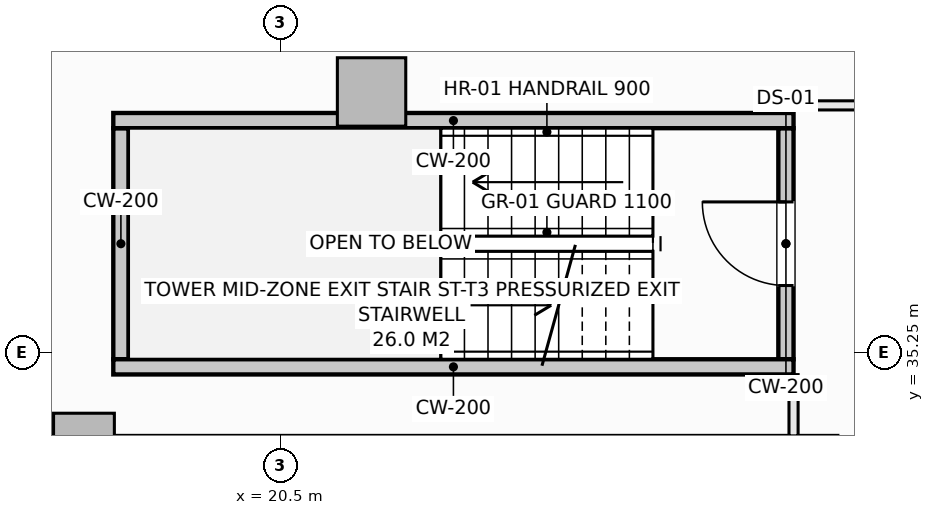
"""IFC4 building model, lengths in metres.
Left out: names, types, materials, properties, quantities, classifications, styles, units other than length and angle.
Written with IfcOpenShell. Run it as: python <this file> out.ifc"""

import sys

from ifc_helpers import new_model, si_unit, direction, frame, frame_2d, origin, origin_2d, place, context, subcontext, project, spatial, rectangle, extrude, element, fill, save


model = new_model("IFC4")
c1 = context("Model", 3, precision=1e-05, world=origin(), true_north=direction((0.0, 1.0)))
c2 = subcontext(c1, "Body", "Model", "MODEL_VIEW")
j1 = project(units=[si_unit("LENGTHUNIT", "METRE"), si_unit("PLANEANGLEUNIT", "RADIAN")], contexts=[c1])
p1 = place(None, origin())
s1 = spatial("IfcSite", under=j1, at=p1, CompositionType="ELEMENT")
p2 = place(p1, origin())
s2 = spatial("IfcBuilding", under=s1, at=p2, CompositionType="ELEMENT")
p3 = place(p2, frame((0.0, 0.0, 135.9)))
s3 = spatial("IfcBuildingStorey", under=s2, at=p3, CompositionType="ELEMENT", Elevation=135.9)
p4 = place(p3, frame((21.698, 38.677, -0.27), z_axis=(0.0, 0.0, 1.0), x_axis=(1.0, 0.0, 0.0)))
e1 = element("IfcColumn", 1, at=p4, inside=s3, PredefinedType="COLUMN", context=c2, shape_type="SweptSolid", body=[
    extrude(rectangle(XDim=0.9, YDim=0.9, at=origin_2d()), origin(), (0.0, 0.0, 1.0), 3.4),
])
p5 = place(p3, frame((17.914, 34.05, -0.27), z_axis=(0.0, 0.0, 1.0), x_axis=(1.0, 0.0, 0.0)))
e2 = element("IfcColumn", 2, at=p5, inside=s3, PredefinedType="PILASTER", context=c2, shape_type="SweptSolid", body=[
    extrude(rectangle(XDim=0.8, YDim=0.8, at=origin_2d()), origin(), (0.0, 0.0, 1.0), 3.4),
])
p6 = place(p3, frame((14.481, 39.223, 0.0), z_axis=(0.0, 0.0, 1.0), x_axis=(0.616435134162, 0.787405693001, 0.0)))
e3 = element("IfcWall", 3, at=p6, inside=s3, PredefinedType="SOLIDWALL", context=c2, shape_type="SweptSolid", body=[
    extrude(rectangle(XDim=5.759, YDim=0.3, at=frame_2d((2.879, 0.0))), origin(), (0.0, 0.0, 1.0), 2.653),
])
p7 = place(p6, frame((1.92, 0.0, 0.74)))
e4 = element("IfcOpeningElement", 4, at=p7, cuts=e3, PredefinedType="OPENING", context=c2, shape_type="SweptSolid", body=[
    extrude(rectangle(XDim=2.1, YDim=1.7, at=frame_2d((1.05, 0.85))), frame((0.0, 0.16, 0.0), z_axis=(0.0, -1.0, 0.0), x_axis=(1.0, 0.0, 0.0)), (0.0, 0.0, 1.0), 0.32),
])
p8 = place(p3, frame((27.15, 35.16, -0.27), z_axis=(0.0, 0.0, 1.0), x_axis=(0.0, 1.0, 0.0)))
e5 = element("IfcWall", 5, at=p8, inside=s3, PredefinedType="SHEAR", context=c2, shape_type="SweptSolid", body=[
    extrude(rectangle(XDim=3.04, YDim=0.2, at=frame_2d((1.52, 0.0))), origin(), (0.0, 0.0, 1.0), 3.4),
])
p9 = place(p8, frame((0.97, 0.0, 0.27)))
e6 = element("IfcOpeningElement", 6, at=p9, cuts=e5, PredefinedType="OPENING", context=c2, shape_type="SweptSolid", body=[
    extrude(rectangle(XDim=1.1, YDim=2.15, at=frame_2d((0.55, 1.075))), frame((0.0, 0.11, 0.0), z_axis=(0.0, -1.0, 0.0), x_axis=(1.0, 0.0, 0.0)), (0.0, 0.0, 1.0), 0.22),
])
p10 = place(p3, frame((18.4, 35.16, -0.27), z_axis=(0.0, 0.0, 1.0), x_axis=(0.0, 1.0, 0.0)))
e7 = element("IfcWall", 7, at=p10, inside=s3, PredefinedType="SHEAR", context=c2, shape_type="SweptSolid", body=[
    extrude(rectangle(XDim=3.04, YDim=0.2, at=frame_2d((1.52, 0.0))), origin(), (0.0, 0.0, 1.0), 3.4),
])
for number, where, z_axis, x_axis in (
    (8, (18.3, 38.3, -0.27), (0.0, 0.0, 1.0), (1.0, 0.0, 0.0)),
    (9, (18.3, 35.06, -0.27), (0.0, 0.0, 1.0), (1.0, 0.0, 0.0)),
):
    element("IfcWall", number, at=place(p3, frame(where, z_axis=z_axis, x_axis=x_axis)), inside=s3, PredefinedType="SHEAR", context=c2, shape_type="SweptSolid", body=[
        extrude(rectangle(XDim=8.95, YDim=0.2, at=frame_2d((4.475, 0.0))), origin(), (0.0, 0.0, 1.0), 3.4),
    ])
p11 = place(p3, frame((27.25, 34.152, 0.0), z_axis=(0.0, 0.0, 1.0), x_axis=(0.0, 1.0, 0.0)))
e10 = element("IfcWall", 10, at=p11, inside=s3, PredefinedType="PARTITIONING", context=c2, shape_type="SweptSolid", body=[
    extrude(rectangle(XDim=0.806, YDim=0.12, at=frame_2d((0.403, 0.0))), origin(), (0.0, 0.0, 1.0), 3.13),
])
p12 = place(p3, frame((27.25, 38.5, 0.0), z_axis=(0.0, 0.0, 1.0), x_axis=(1.0, 0.0, 0.0)))
e11 = element("IfcWall", 11, at=p12, inside=s3, PredefinedType="PARTITIONING", context=c2, shape_type="SweptSolid", body=[
    extrude(rectangle(XDim=2.53, YDim=0.12, at=frame_2d((1.265, 0.0))), origin(), (0.0, 0.0, 1.0), 3.13),
])
p13 = place(p9, origin())
e12 = element("IfcDoor", 12, at=p13, inside=s3, OperationType="SINGLE_SWING_RIGHT", PredefinedType="DOOR", context=c2, shape_type="SweptSolid", body=[
    extrude(rectangle(XDim=1.1, YDim=2.15, at=frame_2d((0.55, 1.075))), frame((0.0, 0.025, 0.0), z_axis=(0.0, -1.0, 0.0), x_axis=(1.0, 0.0, 0.0)), (0.0, 0.0, 1.0), 0.05),
])
fill(e6, e12)
save(model, sys.argv[1])
